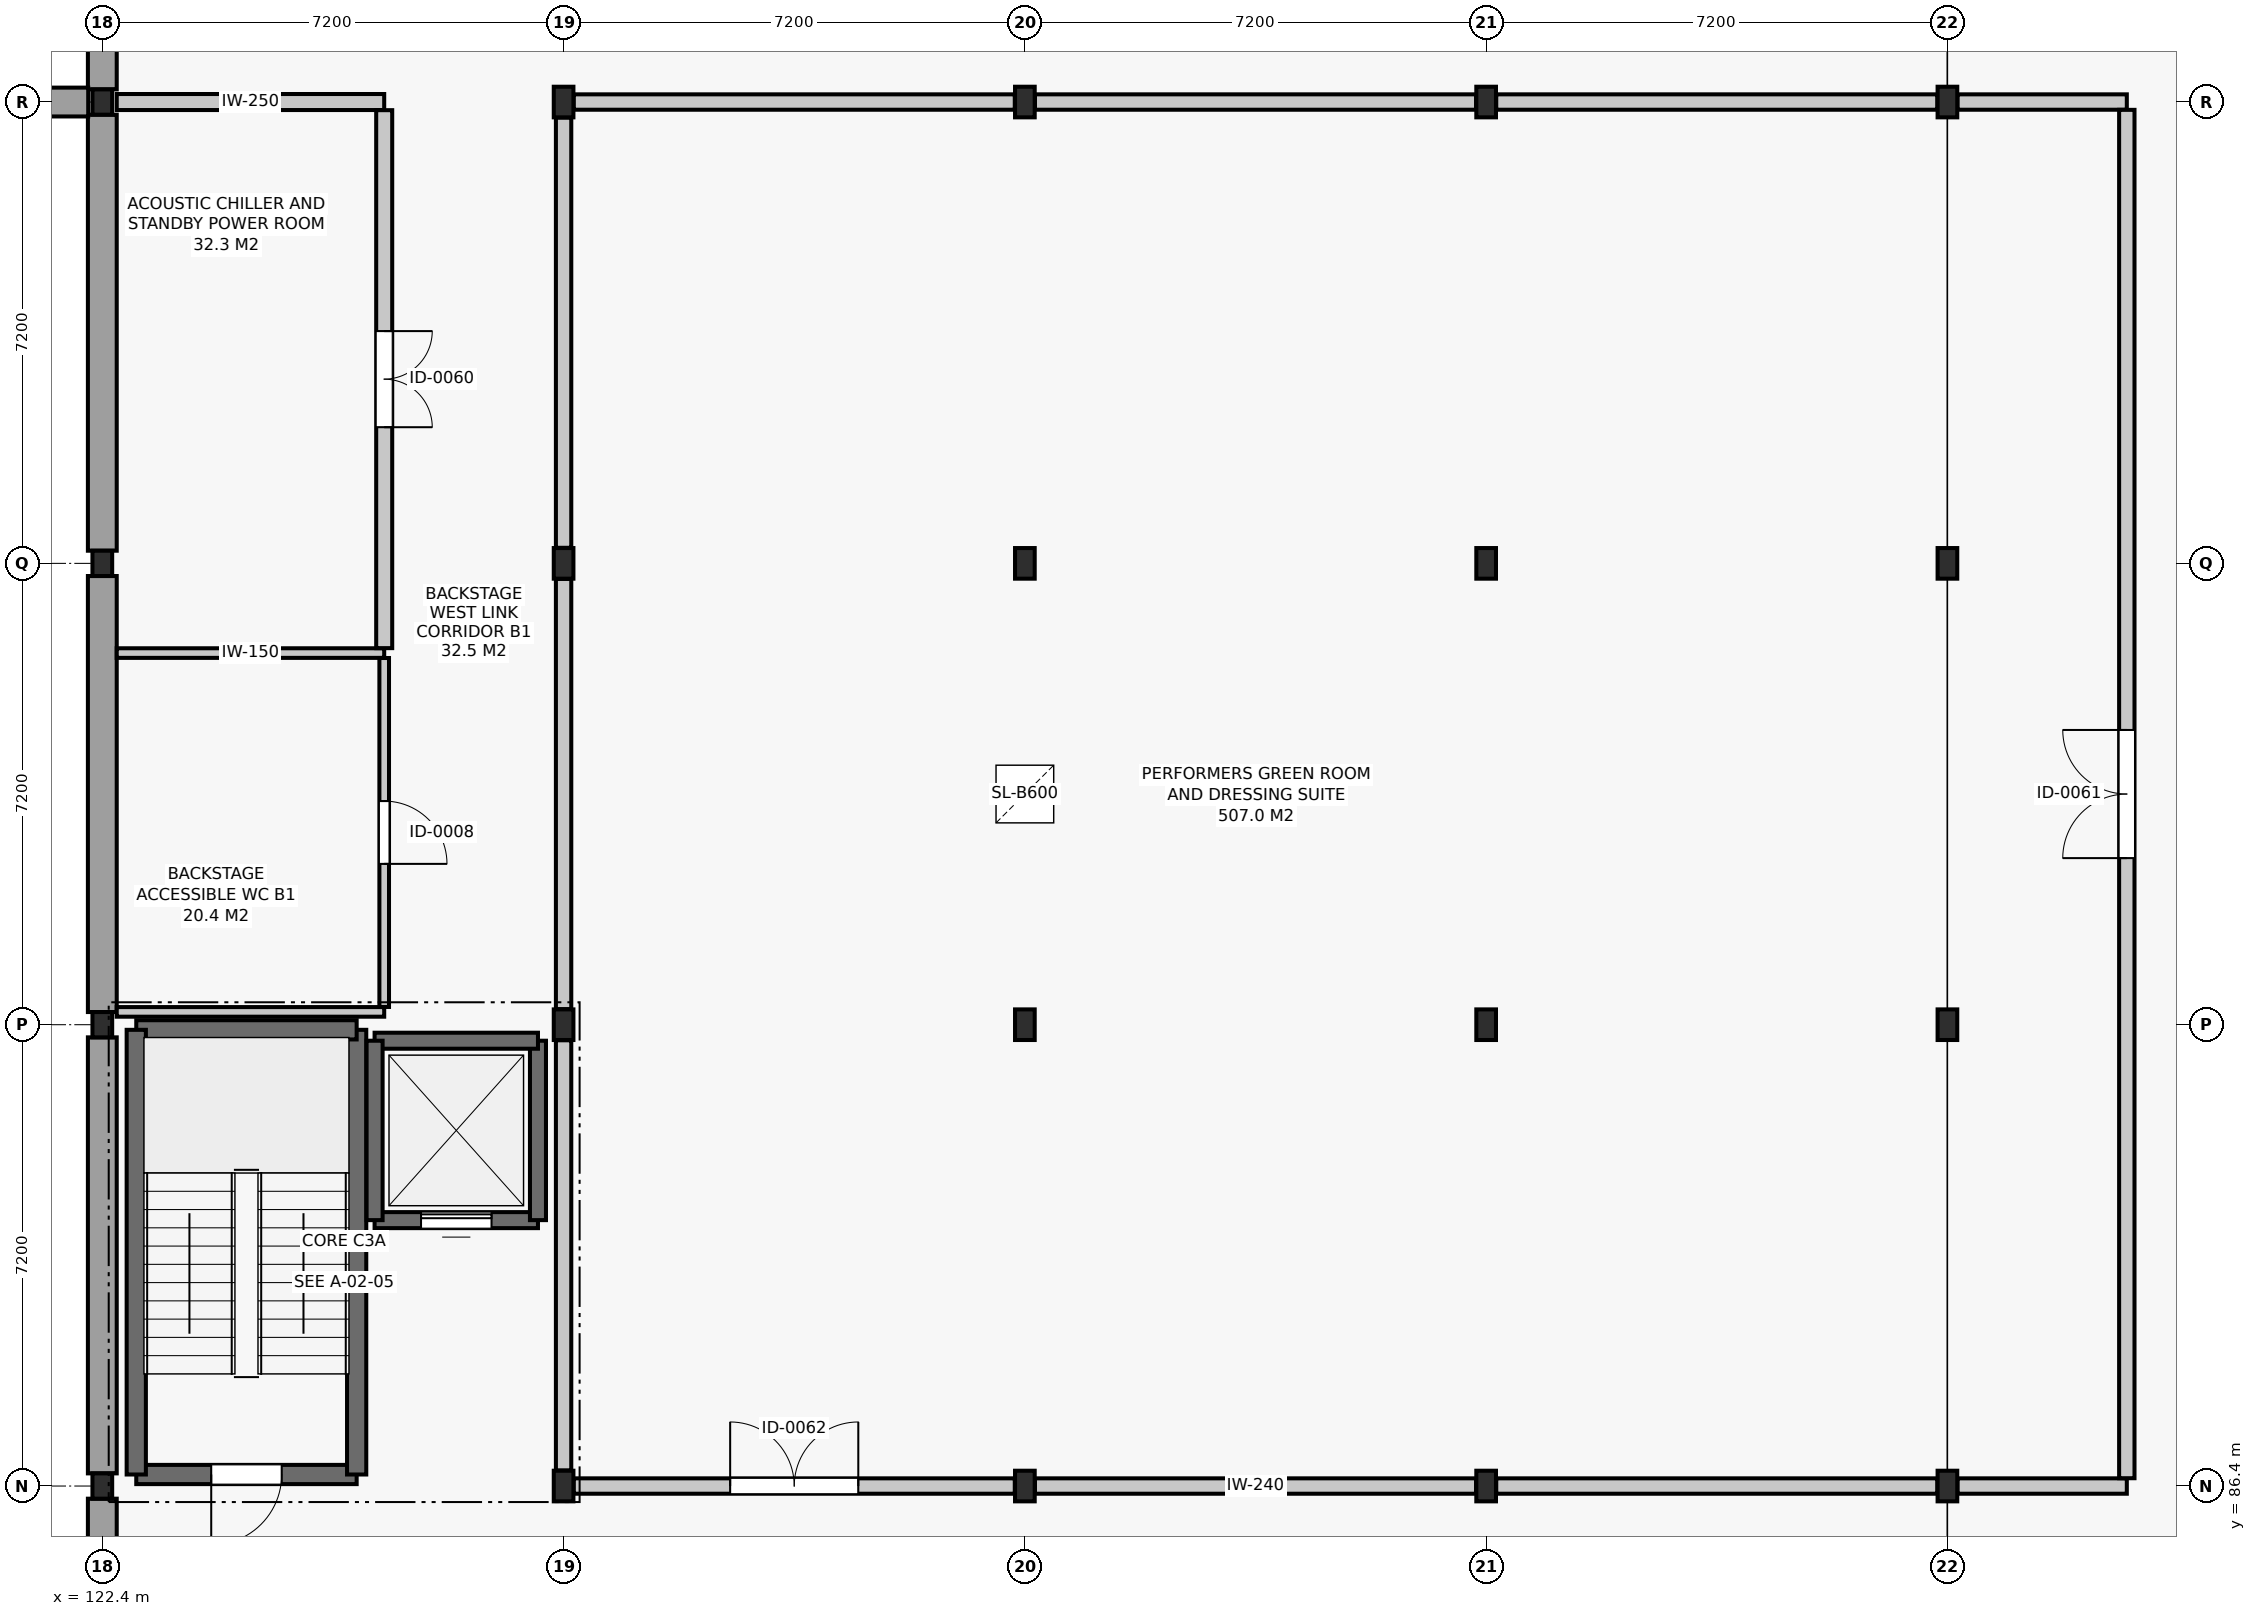
"""IFC4 building model, lengths in metres.
Left out: names, types, materials, properties, quantities, classifications, styles, units other than length and angle.
Written with IfcOpenShell. Run it as: python <this file> out.ifc"""

import sys

from ifc_helpers import new_model, si_unit, direction, frame, frame_2d, origin, origin_2d, place, context, subcontext, project, spatial, rectangle, i_section, extrude, element, fill, save


model = new_model("IFC4")
c1 = context("Model", 3, precision=1e-05, world=origin(), true_north=direction((0.0, 1.0)))
c2 = subcontext(c1, "Body", "Model", "MODEL_VIEW")
j1 = project(units=[si_unit("LENGTHUNIT", "METRE"), si_unit("PLANEANGLEUNIT", "RADIAN")], contexts=[c1])
p1 = place(None, origin())
s1 = spatial("IfcSite", under=j1, at=p1, CompositionType="ELEMENT")
p2 = place(p1, origin())
s2 = spatial("IfcBuilding", under=s1, at=p2, CompositionType="ELEMENT")
p3 = place(p2, frame((0.0, 0.0, -4.2)))
s3 = spatial("IfcBuildingStorey", under=s2, at=p3, CompositionType="ELEMENT", Elevation=-4.2)
for number, where, z_axis, x_axis in (
    (1, (122.4, 86.4, 0.0), (0.0, 0.0, 1.0), (1.0, 0.0, 0.0)),
    (2, (122.4, 93.6, 0.0), (0.0, 0.0, 1.0), (1.0, 0.0, 0.0)),
    (3, (122.4, 100.8, 0.0), (0.0, 0.0, 1.0), (1.0, 0.0, 0.0)),
    (4, (122.4, 108.0, 0.0), (0.0, 0.0, 1.0), (1.0, 0.0, 0.0)),
):
    element("IfcColumn", number, at=place(p3, frame(where, z_axis=z_axis, x_axis=x_axis)), inside=s3, PredefinedType="COLUMN", context=c2, shape_type="SweptSolid", body=[
        extrude(i_section(OverallWidth=0.308, OverallDepth=0.395, WebThickness=0.021, FlangeThickness=0.036, FilletRadius=0.027, at=origin_2d()), origin(), (0.0, 0.0, 1.0), 4.2),
    ])
for number, where, z_axis, x_axis in (
    (5, (129.6, 86.4, 0.0), (0.0, 0.0, 1.0), (1.0, 0.0, 0.0)),
    (6, (129.6, 93.6, 0.0), (0.0, 0.0, 1.0), (1.0, 0.0, 0.0)),
    (7, (129.6, 100.8, 0.0), (0.0, 0.0, 1.0), (1.0, 0.0, 0.0)),
    (8, (129.6, 108.0, 0.0), (0.0, 0.0, 1.0), (1.0, 0.0, 0.0)),
    (9, (136.8, 86.4, 0.0), (0.0, 0.0, 1.0), (1.0, 0.0, 0.0)),
    (10, (136.8, 93.6, 0.0), (0.0, 0.0, 1.0), (1.0, 0.0, 0.0)),
    (11, (136.8, 100.8, 0.0), (0.0, 0.0, 1.0), (1.0, 0.0, 0.0)),
    (12, (136.8, 108.0, 0.0), (0.0, 0.0, 1.0), (1.0, 0.0, 0.0)),
    (13, (144.0, 86.4, 0.0), (0.0, 0.0, 1.0), (1.0, 0.0, 0.0)),
    (14, (144.0, 93.6, 0.0), (0.0, 0.0, 1.0), (1.0, 0.0, 0.0)),
    (15, (144.0, 100.8, 0.0), (0.0, 0.0, 1.0), (1.0, 0.0, 0.0)),
    (16, (144.0, 108.0, 0.0), (0.0, 0.0, 1.0), (1.0, 0.0, 0.0)),
    (17, (151.2, 86.4, 0.0), (0.0, 0.0, 1.0), (1.0, 0.0, 0.0)),
    (18, (151.2, 93.6, 0.0), (0.0, 0.0, 1.0), (1.0, 0.0, 0.0)),
    (19, (151.2, 100.8, 0.0), (0.0, 0.0, 1.0), (1.0, 0.0, 0.0)),
    (20, (151.2, 108.0, 0.0), (0.0, 0.0, 1.0), (1.0, 0.0, 0.0)),
):
    element("IfcColumn", number, at=place(p3, frame(where, z_axis=z_axis, x_axis=x_axis)), inside=s3, PredefinedType="COLUMN", context=c2, shape_type="SweptSolid", body=[
        extrude(i_section(OverallWidth=0.307, OverallDepth=0.478, WebThickness=0.021, FlangeThickness=0.04, FilletRadius=0.027, at=origin_2d()), origin(), (0.0, 0.0, 1.0), 4.2),
    ])
p4 = place(p3, frame((122.4, 79.397, 0.0), z_axis=(0.0, 0.0, 1.0), x_axis=(0.0, 1.0, 0.0)))
e21 = element("IfcWall", 21, at=p4, inside=s3, PredefinedType="USERDEFINED", context=c2, shape_type="SweptSolid", body=[
    extrude(rectangle(XDim=6.805, YDim=0.45, at=frame_2d((3.402, 0.0))), origin(), (0.0, 0.0, 1.0), 3.26),
])
p5 = place(p3, frame((122.4, 86.597, 0.0), z_axis=(0.0, 0.0, 1.0), x_axis=(0.0, 1.0, 0.0)))
e22 = element("IfcWall", 22, at=p5, inside=s3, PredefinedType="USERDEFINED", context=c2, shape_type="SweptSolid", body=[
    extrude(rectangle(XDim=6.805, YDim=0.45, at=frame_2d((3.403, 0.0))), origin(), (0.0, 0.0, 1.0), 3.26),
])
for number, where, z_axis, x_axis in (
    (23, (122.4, 93.798, 0.0), (0.0, 0.0, 1.0), (0.0, 1.0, 0.0)),
    (24, (122.4, 100.998, 0.0), (0.0, 0.0, 1.0), (0.0, 1.0, 0.0)),
    (25, (122.4, 108.198, 0.0), (0.0, 0.0, 1.0), (0.0, 1.0, 0.0)),
):
    element("IfcWall", number, at=place(p3, frame(where, z_axis=z_axis, x_axis=x_axis)), inside=s3, PredefinedType="USERDEFINED", context=c2, shape_type="SweptSolid", body=[
        extrude(rectangle(XDim=6.805, YDim=0.45, at=frame_2d((3.402, 0.0))), origin(), (0.0, 0.0, 1.0), 3.26),
    ])
p6 = place(p3, frame((57.82, 108.0, 0.0), z_axis=(0.0, 0.0, 1.0), x_axis=(1.0, 0.0, 0.0)))
e26 = element("IfcWall", 26, at=p6, inside=s3, PredefinedType="USERDEFINED", context=c2, shape_type="SweptSolid", body=[
    extrude(rectangle(XDim=64.36, YDim=0.45, at=frame_2d((32.18, 0.0))), origin(), (0.0, 0.0, 1.0), 3.98),
])
p7 = place(p3, frame((122.93, 86.58, 0.0), z_axis=(0.0, 0.0, 1.0), x_axis=(1.0, 0.0, 0.0)))
e27 = element("IfcWall", 27, at=p7, inside=s3, PredefinedType="SHEAR", context=c2, shape_type="SweptSolid", body=[
    extrude(rectangle(XDim=3.44, YDim=0.3, at=frame_2d((1.72, 0.0))), origin(), (0.0, 0.0, 1.0), 3.88),
])
p8 = place(p7, frame((1.17, 0.0, 0.0)))
e28 = element("IfcOpeningElement", 28, at=p8, cuts=e27, PredefinedType="OPENING", context=c2, shape_type="SweptSolid", body=[
    extrude(rectangle(XDim=1.1, YDim=2.15, at=frame_2d((0.55, 1.075))), frame((0.0, 0.162, 0.0), z_axis=(0.0, -1.0, 0.0), x_axis=(1.0, 0.0, 0.0)), (0.0, 0.0, 1.0), 0.324),
])
p9 = place(p3, frame((126.37, 86.58, 0.0), z_axis=(0.0, 0.0, 1.0), x_axis=(0.0, 1.0, 0.0)))
e29 = element("IfcWall", 29, at=p9, inside=s3, PredefinedType="SHEAR", context=c2, shape_type="SweptSolid", body=[
    extrude(rectangle(XDim=6.94, YDim=0.3, at=frame_2d((3.47, 0.0))), origin(), (0.0, 0.0, 1.0), 3.88),
])
p10 = place(p3, frame((126.37, 93.52, 0.0), z_axis=(0.0, 0.0, 1.0), x_axis=(-1.0, 0.0, 0.0)))
e30 = element("IfcWall", 30, at=p10, inside=s3, PredefinedType="SHEAR", context=c2, shape_type="SweptSolid", body=[
    extrude(rectangle(XDim=3.44, YDim=0.3, at=frame_2d((1.72, 0.0))), origin(), (0.0, 0.0, 1.0), 3.88),
])
p11 = place(p3, frame((122.93, 93.52, 0.0), z_axis=(0.0, 0.0, 1.0), x_axis=(0.0, -1.0, 0.0)))
e31 = element("IfcWall", 31, at=p11, inside=s3, PredefinedType="SHEAR", context=c2, shape_type="SweptSolid", body=[
    extrude(rectangle(XDim=6.94, YDim=0.3, at=frame_2d((3.47, 0.0))), origin(), (0.0, 0.0, 1.0), 3.88),
])
p12 = place(p3, frame((126.65, 90.55, 0.0), z_axis=(0.0, 0.0, 1.0), x_axis=(1.0, 0.0, 0.0)))
e32 = element("IfcWall", 32, at=p12, inside=s3, PredefinedType="SHEAR", context=c2, shape_type="SweptSolid", body=[
    extrude(rectangle(XDim=2.55, YDim=0.25, at=frame_2d((1.275, 0.0))), origin(), (0.0, 0.0, 1.0), 3.88),
])
p13 = place(p12, frame((0.725, 0.0, 0.0)))
e33 = element("IfcOpeningElement", 33, at=p13, cuts=e32, PredefinedType="OPENING", context=c2, shape_type="SweptSolid", body=[
    extrude(rectangle(XDim=1.1, YDim=2.1, at=frame_2d((0.55, 1.05))), frame((0.0, 0.137, 0.0), z_axis=(0.0, -1.0, 0.0), x_axis=(1.0, 0.0, 0.0)), (0.0, 0.0, 1.0), 0.274),
])
p14 = place(p3, frame((129.2, 90.55, 0.0), z_axis=(0.0, 0.0, 1.0), x_axis=(0.0, 1.0, 0.0)))
e34 = element("IfcWall", 34, at=p14, inside=s3, PredefinedType="SHEAR", context=c2, shape_type="SweptSolid", body=[
    extrude(rectangle(XDim=2.8, YDim=0.25, at=frame_2d((1.4, 0.0))), origin(), (0.0, 0.0, 1.0), 3.88),
])
p15 = place(p3, frame((129.2, 93.35, 0.0), z_axis=(0.0, 0.0, 1.0), x_axis=(-1.0, 0.0, 0.0)))
e35 = element("IfcWall", 35, at=p15, inside=s3, PredefinedType="SHEAR", context=c2, shape_type="SweptSolid", body=[
    extrude(rectangle(XDim=2.55, YDim=0.25, at=frame_2d((1.275, 0.0))), origin(), (0.0, 0.0, 1.0), 3.88),
])
p16 = place(p3, frame((126.65, 93.35, 0.0), z_axis=(0.0, 0.0, 1.0), x_axis=(0.0, -1.0, 0.0)))
e36 = element("IfcWall", 36, at=p16, inside=s3, PredefinedType="SHEAR", context=c2, shape_type="SweptSolid", body=[
    extrude(rectangle(XDim=2.8, YDim=0.25, at=frame_2d((1.4, 0.0))), origin(), (0.0, 0.0, 1.0), 3.88),
])
for number, where, z_axis, x_axis in (
    (37, (122.625, 93.8, 0.0), (0.0, 0.0, 1.0), (1.0, 0.0, 0.0)),
    (38, (122.625, 99.4, 0.0), (0.0, 0.0, 1.0), (1.0, 0.0, 0.0)),
):
    element("IfcWall", number, at=place(p3, frame(where, z_axis=z_axis, x_axis=x_axis)), inside=s3, PredefinedType="PARTITIONING", context=c2, shape_type="SweptSolid", body=[
        extrude(rectangle(XDim=4.175, YDim=0.15, at=frame_2d((2.087, 0.0))), origin(), (0.0, 0.0, 1.0), 3.315),
    ])
p17 = place(p3, frame((122.625, 108.0, 0.0), z_axis=(0.0, 0.0, 1.0), x_axis=(1.0, 0.0, 0.0)))
e39 = element("IfcWall", 39, at=p17, inside=s3, PredefinedType="SOLIDWALL", context=c2, shape_type="SweptSolid", body=[
    extrude(rectangle(XDim=4.175, YDim=0.25, at=frame_2d((2.087, 0.0))), origin(), (0.0, 0.0, 1.0), 3.375),
])
p18 = place(p3, frame((129.758, 86.4, 0.0), z_axis=(0.0, 0.0, 1.0), x_axis=(1.0, 0.0, 0.0)))
e40 = element("IfcWall", 40, at=p18, inside=s3, PredefinedType="SOLIDWALL", context=c2, shape_type="SweptSolid", body=[
    extrude(rectangle(XDim=6.885, YDim=0.24, at=frame_2d((3.442, 0.0))), origin(), (0.0, 0.0, 1.0), 3.375),
])
p19 = place(p18, frame((2.442, 0.0, 0.0)))
e41 = element("IfcOpeningElement", 41, at=p19, cuts=e40, PredefinedType="OPENING", context=c2, shape_type="SweptSolid", body=[
    extrude(rectangle(XDim=2.0, YDim=2.4, at=frame_2d((1.0, 1.2))), frame((0.0, 0.132, 0.0), z_axis=(0.0, -1.0, 0.0), x_axis=(1.0, 0.0, 0.0)), (0.0, 0.0, 1.0), 0.264),
])
for number, where, z_axis, x_axis in (
    (42, (136.958, 86.4, 0.0), (0.0, 0.0, 1.0), (1.0, 0.0, 0.0)),
    (43, (144.157, 86.4, 0.0), (0.0, 0.0, 1.0), (1.0, 0.0, 0.0)),
):
    element("IfcWall", number, at=place(p3, frame(where, z_axis=z_axis, x_axis=x_axis)), inside=s3, PredefinedType="SOLIDWALL", context=c2, shape_type="SweptSolid", body=[
        extrude(rectangle(XDim=6.885, YDim=0.24, at=frame_2d((3.442, 0.0))), origin(), (0.0, 0.0, 1.0), 3.375),
    ])
p20 = place(p3, frame((151.357, 86.4, 0.0), z_axis=(0.0, 0.0, 1.0), x_axis=(1.0, 0.0, 0.0)))
e44 = element("IfcWall", 44, at=p20, inside=s3, PredefinedType="SOLIDWALL", context=c2, shape_type="SweptSolid", body=[
    extrude(rectangle(XDim=2.643, YDim=0.24, at=frame_2d((1.321, 0.0))), origin(), (0.0, 0.0, 1.0), 3.375),
])
for number, where, z_axis, x_axis in (
    (45, (129.758, 108.0, 0.0), (0.0, 0.0, 1.0), (1.0, 0.0, 0.0)),
    (46, (136.958, 108.0, 0.0), (0.0, 0.0, 1.0), (1.0, 0.0, 0.0)),
    (47, (144.157, 108.0, 0.0), (0.0, 0.0, 1.0), (1.0, 0.0, 0.0)),
):
    element("IfcWall", number, at=place(p3, frame(where, z_axis=z_axis, x_axis=x_axis)), inside=s3, PredefinedType="SOLIDWALL", context=c2, shape_type="SweptSolid", body=[
        extrude(rectangle(XDim=6.885, YDim=0.24, at=frame_2d((3.442, 0.0))), origin(), (0.0, 0.0, 1.0), 3.375),
    ])
p21 = place(p3, frame((151.357, 108.0, 0.0), z_axis=(0.0, 0.0, 1.0), x_axis=(1.0, 0.0, 0.0)))
e48 = element("IfcWall", 48, at=p21, inside=s3, PredefinedType="SOLIDWALL", context=c2, shape_type="SweptSolid", body=[
    extrude(rectangle(XDim=2.643, YDim=0.24, at=frame_2d((1.321, 0.0))), origin(), (0.0, 0.0, 1.0), 3.375),
])
p22 = place(p3, frame((126.8, 93.877, 0.0), z_axis=(0.0, 0.0, 1.0), x_axis=(0.0, 1.0, 0.0)))
e49 = element("IfcWall", 49, at=p22, inside=s3, PredefinedType="PARTITIONING", context=c2, shape_type="SweptSolid", body=[
    extrude(rectangle(XDim=5.446, YDim=0.15, at=frame_2d((2.723, 0.0))), origin(), (0.0, 0.0, 1.0), 3.865),
])
p23 = place(p22, frame((2.233, 0.0, 0.0)))
e50 = element("IfcOpeningElement", 50, at=p23, cuts=e49, PredefinedType="OPENING", context=c2, shape_type="SweptSolid", body=[
    extrude(rectangle(XDim=0.98, YDim=2.1, at=frame_2d((0.49, 1.05))), frame((0.0, 0.087, 0.0), z_axis=(0.0, -1.0, 0.0), x_axis=(1.0, 0.0, 0.0)), (0.0, 0.0, 1.0), 0.174),
])
p24 = place(p3, frame((126.8, 99.477, 0.0), z_axis=(0.0, 0.0, 1.0), x_axis=(0.0, 1.0, 0.0)))
e51 = element("IfcWall", 51, at=p24, inside=s3, PredefinedType="SOLIDWALL", context=c2, shape_type="SweptSolid", body=[
    extrude(rectangle(XDim=8.396, YDim=0.25, at=frame_2d((4.198, 0.0))), origin(), (0.0, 0.0, 1.0), 3.375),
])
p25 = place(p24, frame((3.448, 0.0, 0.0)))
e52 = element("IfcOpeningElement", 52, at=p25, cuts=e51, PredefinedType="OPENING", context=c2, shape_type="SweptSolid", body=[
    extrude(rectangle(XDim=1.5, YDim=2.2, at=frame_2d((0.75, 1.1))), frame((0.0, 0.137, 0.0), z_axis=(0.0, -1.0, 0.0), x_axis=(1.0, 0.0, 0.0)), (0.0, 0.0, 1.0), 0.274),
])
for number, where, z_axis, x_axis in (
    (53, (129.6, 86.643, 0.0), (0.0, 0.0, 1.0), (0.0, 1.0, 0.0)),
    (54, (129.6, 93.843, 0.0), (0.0, 0.0, 1.0), (0.0, 1.0, 0.0)),
):
    element("IfcWall", number, at=place(p3, frame(where, z_axis=z_axis, x_axis=x_axis)), inside=s3, PredefinedType="SOLIDWALL", context=c2, shape_type="SweptSolid", body=[
        extrude(rectangle(XDim=6.714, YDim=0.24, at=frame_2d((3.357, 0.0))), origin(), (0.0, 0.0, 1.0), 3.425),
    ])
p26 = place(p3, frame((129.6, 101.043, 0.0), z_axis=(0.0, 0.0, 1.0), x_axis=(0.0, 1.0, 0.0)))
e55 = element("IfcWall", 55, at=p26, inside=s3, PredefinedType="SOLIDWALL", context=c2, shape_type="SweptSolid", body=[
    extrude(rectangle(XDim=6.714, YDim=0.24, at=frame_2d((3.357, 0.0))), origin(), (0.0, 0.0, 1.0), 3.425),
])
p27 = place(p3, frame((154.0, 86.522, 0.0), z_axis=(0.0, 0.0, 1.0), x_axis=(0.0, 1.0, 0.0)))
e56 = element("IfcWall", 56, at=p27, inside=s3, PredefinedType="SOLIDWALL", context=c2, shape_type="SweptSolid", body=[
    extrude(rectangle(XDim=21.356, YDim=0.24, at=frame_2d((10.678, 0.0))), origin(), (0.0, 0.0, 1.0), 3.375),
])
p28 = place(p27, frame((9.678, 0.0, 0.0)))
e57 = element("IfcOpeningElement", 57, at=p28, cuts=e56, PredefinedType="OPENING", context=c2, shape_type="SweptSolid", body=[
    extrude(rectangle(XDim=2.0, YDim=2.4, at=frame_2d((1.0, 1.2))), frame((0.0, 0.132, 0.0), z_axis=(0.0, -1.0, 0.0), x_axis=(1.0, 0.0, 0.0)), (0.0, 0.0, 1.0), 0.264),
])
p29 = place(p8, frame((1.1, 0.0, 0.0), z_axis=(0.0, 0.0, 1.0), x_axis=(-1.0, 0.0, 0.0)))
e58 = element("IfcDoor", 58, at=p29, inside=s3, OperationType="SINGLE_SWING_RIGHT", PredefinedType="DOOR", context=c2, shape_type="SweptSolid", body=[
    extrude(rectangle(XDim=1.1, YDim=2.15, at=frame_2d((0.55, 1.075))), frame((0.0, 0.025, 0.0), z_axis=(0.0, -1.0, 0.0), x_axis=(1.0, 0.0, 0.0)), (0.0, 0.0, 1.0), 0.05),
])
fill(e28, e58)
p30 = place(p13, origin())
e59 = element("IfcDoor", 59, at=p30, inside=s3, OperationType="SLIDING_TO_LEFT", PredefinedType="DOOR", context=c2, shape_type="SweptSolid", body=[
    extrude(rectangle(XDim=1.1, YDim=2.1, at=frame_2d((0.55, 1.05))), frame((0.0, 0.025, 0.0), z_axis=(0.0, -1.0, 0.0), x_axis=(1.0, 0.0, 0.0)), (0.0, 0.0, 1.0), 0.05),
])
fill(e33, e59)
p31 = place(p23, frame((0.98, 0.0, 0.0), z_axis=(0.0, 0.0, 1.0), x_axis=(-1.0, 0.0, 0.0)))
e60 = element("IfcDoor", 60, at=p31, inside=s3, OperationType="SINGLE_SWING_RIGHT", PredefinedType="DOOR", context=c2, shape_type="SweptSolid", body=[
    extrude(rectangle(XDim=0.98, YDim=2.1, at=frame_2d((0.49, 1.05))), frame((0.0, 0.025, 0.0), z_axis=(0.0, -1.0, 0.0), x_axis=(1.0, 0.0, 0.0)), (0.0, 0.0, 1.0), 0.05),
])
fill(e50, e60)
p32 = place(p25, frame((1.5, 0.0, 0.0), z_axis=(0.0, 0.0, 1.0), x_axis=(-1.0, 0.0, 0.0)))
e61 = element("IfcDoor", 61, at=p32, inside=s3, OperationType="DOUBLE_DOOR_SINGLE_SWING", PredefinedType="DOOR", context=c2, shape_type="SweptSolid", body=[
    extrude(rectangle(XDim=1.5, YDim=2.2, at=frame_2d((0.75, 1.1))), frame((0.0, 0.025, 0.0), z_axis=(0.0, -1.0, 0.0), x_axis=(1.0, 0.0, 0.0)), (0.0, 0.0, 1.0), 0.05),
])
fill(e52, e61)
p33 = place(p28, origin())
e62 = element("IfcDoor", 62, at=p33, inside=s3, OperationType="DOUBLE_DOOR_SINGLE_SWING", PredefinedType="DOOR", context=c2, shape_type="SweptSolid", body=[
    extrude(rectangle(XDim=2.0, YDim=2.4, at=frame_2d((1.0, 1.2))), frame((0.0, 0.025, 0.0), z_axis=(0.0, -1.0, 0.0), x_axis=(1.0, 0.0, 0.0)), (0.0, 0.0, 1.0), 0.05),
])
fill(e57, e62)
p34 = place(p19, origin())
e63 = element("IfcDoor", 63, at=p34, inside=s3, OperationType="DOUBLE_DOOR_SINGLE_SWING", PredefinedType="DOOR", context=c2, shape_type="SweptSolid", body=[
    extrude(rectangle(XDim=2.0, YDim=2.4, at=frame_2d((1.0, 1.2))), frame((0.0, 0.025, 0.0), z_axis=(0.0, -1.0, 0.0), x_axis=(1.0, 0.0, 0.0)), (0.0, 0.0, 1.0), 0.05),
])
fill(e41, e63)
save(model, sys.argv[1])
